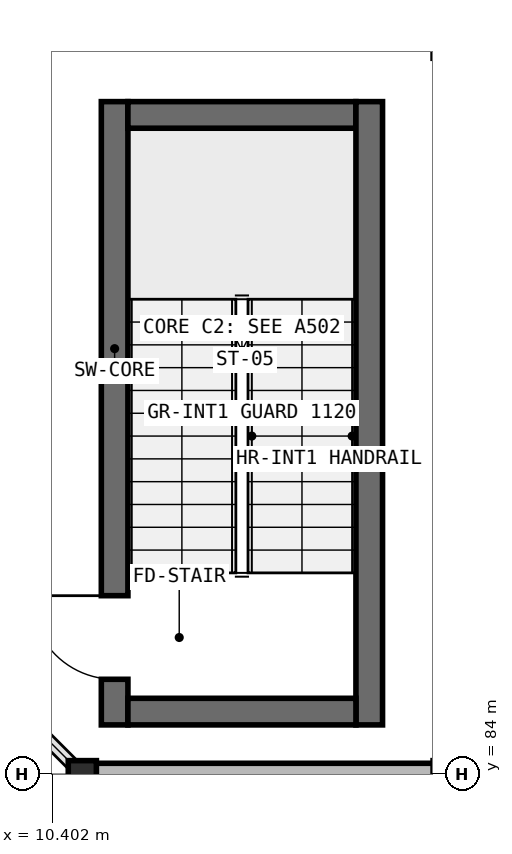
"""IFC4 building model, lengths in metres.
Left out: names, types, materials, properties, quantities, classifications, styles, units other than length and angle.
Written with IfcOpenShell. Run it as: python <this file> out.ifc"""

import sys

from ifc_helpers import new_model, si_unit, direction, frame, frame_2d, origin, origin_2d, place, context, subcontext, project, spatial, rectangle, i_section, extrude, element, fill, save


model = new_model("IFC4")
c1 = context("Model", 3, precision=1e-05, world=origin(), true_north=direction((0.0, 1.0)))
c2 = subcontext(c1, "Body", "Model", "MODEL_VIEW")
j1 = project(units=[si_unit("LENGTHUNIT", "METRE"), si_unit("PLANEANGLEUNIT", "RADIAN")], contexts=[c1])
p1 = place(None, origin())
s1 = spatial("IfcSite", under=j1, at=p1, CompositionType="ELEMENT")
p2 = place(p1, origin())
s2 = spatial("IfcBuilding", under=s1, at=p2, CompositionType="ELEMENT")
p3 = place(p2, frame((0.0, 0.0, 9.8)))
s3 = spatial("IfcBuildingStorey", under=s2, at=p3, CompositionType="ELEMENT", Elevation=9.8)
p4 = place(p3, frame((11.225, 84.65, 0.0), z_axis=(0.0, 0.0, 1.0), x_axis=(0.0, 1.0, 0.0)))
e1 = element("IfcWall", 1, at=p4, inside=s3, PredefinedType="SHEAR", context=c2, shape_type="SweptSolid", body=[
    extrude(rectangle(XDim=8.2, YDim=0.35, at=frame_2d((4.1, 0.0))), origin(), (0.0, 0.0, 1.0), 4.55),
])
p5 = place(p4, frame((0.6, 0.0, 0.0)))
e2 = element("IfcOpeningElement", 2, at=p5, cuts=e1, PredefinedType="OPENING", context=c2, shape_type="SweptSolid", body=[
    extrude(rectangle(XDim=1.1, YDim=2.15, at=frame_2d((0.55, 1.075))), frame((0.0, 0.185, 0.0), z_axis=(0.0, -1.0, 0.0), x_axis=(1.0, 0.0, 0.0)), (0.0, 0.0, 1.0), 0.37),
])
p6 = place(p3, frame((11.4, 92.675, 0.0), z_axis=(0.0, 0.0, 1.0), x_axis=(1.0, 0.0, 0.0)))
e3 = element("IfcWall", 3, at=p6, inside=s3, PredefinedType="SHEAR", context=c2, shape_type="SweptSolid", body=[
    extrude(rectangle(XDim=3.0, YDim=0.35, at=frame_2d((1.5, 0.0))), origin(), (0.0, 0.0, 1.0), 4.55),
])
p7 = place(p3, frame((14.575, 92.85, 0.0), z_axis=(0.0, 0.0, 1.0), x_axis=(0.0, -1.0, 0.0)))
e4 = element("IfcWall", 4, at=p7, inside=s3, PredefinedType="SHEAR", context=c2, shape_type="SweptSolid", body=[
    extrude(rectangle(XDim=8.2, YDim=0.35, at=frame_2d((4.1, 0.0))), origin(), (0.0, 0.0, 1.0), 4.55),
])
p8 = place(p3, frame((14.4, 84.825, 0.0), z_axis=(0.0, 0.0, 1.0), x_axis=(-1.0, 0.0, 0.0)))
e5 = element("IfcWall", 5, at=p8, inside=s3, PredefinedType="SHEAR", context=c2, shape_type="SweptSolid", body=[
    extrude(rectangle(XDim=3.0, YDim=0.35, at=frame_2d((1.5, 0.0))), origin(), (0.0, 0.0, 1.0), 4.55),
])
p9 = place(p3, frame((10.8, 84.0, 0.0), z_axis=(0.0, 0.0, 1.0), x_axis=(1.0, 0.0, 0.0)))
e6 = element("IfcColumn", 6, at=p9, inside=s3, PredefinedType="COLUMN", context=c2, shape_type="SweptSolid", body=[
    extrude(i_section(OverallWidth=0.37, OverallDepth=0.36, WebThickness=0.014, FlangeThickness=0.022, at=origin_2d()), origin(), (0.0, 0.0, 1.0), 4.55),
])
p10 = place(p3, frame((15.596, 84.0, 0.0), z_axis=(0.0, 0.0, 1.0), x_axis=(-1.0, 0.0, 0.0)))
e7 = element("IfcWall", 7, at=p10, inside=s3, PredefinedType="SOLIDWALL", context=c2, shape_type="SweptSolid", body=[
    extrude(rectangle(XDim=4.792, YDim=0.29, at=frame_2d((2.396, 0.0))), origin(), (0.0, 0.0, 1.0), 4.37),
])
p11 = place(p5, origin())
e8 = element("IfcDoor", 8, at=p11, inside=s3, OperationType="SINGLE_SWING_RIGHT", PredefinedType="DOOR", context=c2, shape_type="SweptSolid", body=[
    extrude(rectangle(XDim=1.1, YDim=2.15, at=frame_2d((0.55, 1.075))), frame((0.0, 0.025, 0.0), z_axis=(0.0, -1.0, 0.0), x_axis=(1.0, 0.0, 0.0)), (0.0, 0.0, 1.0), 0.05),
])
fill(e2, e8)
save(model, sys.argv[1])
